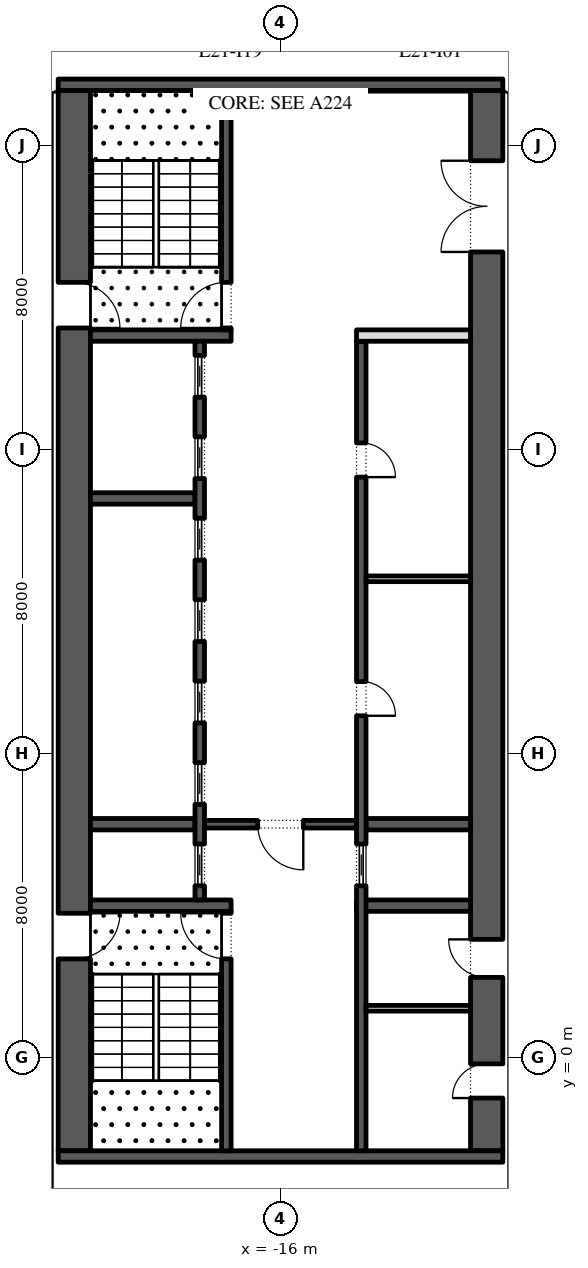
"""IFC4 building model, lengths in metres.
Left out: names, types, materials, properties, quantities, classifications, styles, units other than length and angle.
Written with IfcOpenShell. Run it as: python <this file> out.ifc"""

import sys

from ifc_helpers import new_model, si_unit, direction, frame, frame_2d, origin, place, context, subcontext, project, spatial, rectangle, extrude, element, fill, save


model = new_model("IFC4")
c1 = context("Model", 3, precision=1e-05, world=origin(), true_north=direction((0.0, 1.0)))
c2 = subcontext(c1, "Body", "Model", "MODEL_VIEW")
j1 = project(units=[si_unit("LENGTHUNIT", "METRE"), si_unit("PLANEANGLEUNIT", "RADIAN")], contexts=[c1])
p1 = place(None, origin())
s1 = spatial("IfcSite", under=j1, at=p1, CompositionType="ELEMENT")
p2 = place(p1, origin())
s2 = spatial("IfcBuilding", under=s1, at=p2, CompositionType="ELEMENT")
p3 = place(p2, frame((0.0, 0.0, 99.6)))
s3 = spatial("IfcBuildingStorey", under=s2, at=p3, CompositionType="ELEMENT", Elevation=99.6)
p4 = place(p3, frame((-21.425, -2.45, 0.0), z_axis=(0.0, 0.0, 1.0), x_axis=(0.0, 1.0, 0.0)))
e1 = element("IfcWall", 1, at=p4, inside=s3, PredefinedType="SHEAR", context=c2, shape_type="SweptSolid", body=[
    extrude(rectangle(XDim=27.9, YDim=0.85, at=frame_2d((13.95, 0.0))), origin(), (0.0, 0.0, 1.0), 5.8),
])
p5 = place(p4, frame((5.05, 0.0, 0.0)))
e2 = element("IfcOpeningElement", 2, at=p5, cuts=e1, PredefinedType="OPENING", context=c2, shape_type="SweptSolid", body=[
    extrude(rectangle(XDim=1.2, YDim=2.1, at=frame_2d((0.6, 1.05))), frame((0.0, 0.435, 0.0), z_axis=(0.0, -1.0, 0.0), x_axis=(1.0, 0.0, 0.0)), (0.0, 0.0, 1.0), 0.87),
])
p6 = place(p4, frame((21.65, 0.0, 0.0)))
e3 = element("IfcOpeningElement", 3, at=p6, cuts=e1, PredefinedType="OPENING", context=c2, shape_type="SweptSolid", body=[
    extrude(rectangle(XDim=1.2, YDim=2.1, at=frame_2d((0.6, 1.05))), frame((0.0, 0.435, 0.0), z_axis=(0.0, -1.0, 0.0), x_axis=(1.0, 0.0, 0.0)), (0.0, 0.0, 1.0), 0.87),
])
p7 = place(p3, frame((-10.575, -2.45, 0.0), z_axis=(0.0, 0.0, 1.0), x_axis=(0.0, 1.0, 0.0)))
e4 = element("IfcWall", 4, at=p7, inside=s3, PredefinedType="SHEAR", context=c2, shape_type="SweptSolid", body=[
    extrude(rectangle(XDim=27.9, YDim=0.85, at=frame_2d((13.95, 0.0))), origin(), (0.0, 0.0, 1.0), 5.8),
])
p8 = place(p7, frame((23.65, 0.0, 0.0)))
e5 = element("IfcOpeningElement", 5, at=p8, cuts=e4, PredefinedType="OPENING", context=c2, shape_type="SweptSolid", body=[
    extrude(rectangle(XDim=2.4, YDim=2.1, at=frame_2d((1.2, 1.05))), frame((0.0, 0.435, 0.0), z_axis=(0.0, -1.0, 0.0), x_axis=(1.0, 0.0, 0.0)), (0.0, 0.0, 1.0), 0.87),
])
p9 = place(p7, frame((1.387, 0.0, 0.0)))
e6 = element("IfcOpeningElement", 6, at=p9, cuts=e4, PredefinedType="OPENING", context=c2, shape_type="SweptSolid", body=[
    extrude(rectangle(XDim=0.9, YDim=2.1, at=frame_2d((0.45, 1.05))), frame((0.0, 0.435, 0.0), z_axis=(0.0, -1.0, 0.0), x_axis=(1.0, 0.0, 0.0)), (0.0, 0.0, 1.0), 0.87),
])
p10 = place(p7, frame((4.562, 0.0, 0.0)))
e7 = element("IfcOpeningElement", 7, at=p10, cuts=e4, PredefinedType="OPENING", context=c2, shape_type="SweptSolid", body=[
    extrude(rectangle(XDim=1.0, YDim=2.1, at=frame_2d((0.5, 1.05))), frame((0.0, 0.435, 0.0), z_axis=(0.0, -1.0, 0.0), x_axis=(1.0, 0.0, 0.0)), (0.0, 0.0, 1.0), 0.87),
])
for number, where, z_axis, x_axis in (
    (8, (-21.85, -2.6, 0.0), (0.0, 0.0, 1.0), (1.0, 0.0, 0.0)),
    (9, (-21.85, 25.6, 0.0), (0.0, 0.0, 1.0), (1.0, 0.0, 0.0)),
):
    element("IfcWall", number, at=place(p3, frame(where, z_axis=z_axis, x_axis=x_axis)), inside=s3, PredefinedType="SHEAR", context=c2, shape_type="SweptSolid", body=[
        extrude(rectangle(XDim=11.7, YDim=0.3, at=frame_2d((5.85, 0.0))), origin(), (0.0, 0.0, 1.0), 5.8),
    ])
p11 = place(p3, frame((-21.0, 4.0, 0.0), z_axis=(0.0, 0.0, 1.0), x_axis=(1.0, 0.0, 0.0)))
e10 = element("IfcWall", 10, at=p11, inside=s3, PredefinedType="SHEAR", context=c2, shape_type="SweptSolid", body=[
    extrude(rectangle(XDim=3.7, YDim=0.3, at=frame_2d((1.85, 0.0))), origin(), (0.0, 0.0, 1.0), 5.8),
])
p12 = place(p3, frame((-17.425, -2.45, 0.0), z_axis=(0.0, 0.0, 1.0), x_axis=(0.0, 1.0, 0.0)))
e11 = element("IfcWall", 11, at=p12, inside=s3, PredefinedType="SHEAR", context=c2, shape_type="SweptSolid", body=[
    extrude(rectangle(XDim=6.3, YDim=0.25, at=frame_2d((3.15, 0.0))), origin(), (0.0, 0.0, 1.0), 5.8),
])
p13 = place(p12, frame((5.05, 0.0, 0.0)))
e12 = element("IfcOpeningElement", 12, at=p13, cuts=e11, PredefinedType="OPENING", context=c2, shape_type="SweptSolid", body=[
    extrude(rectangle(XDim=1.2, YDim=2.1, at=frame_2d((0.6, 1.05))), frame((0.0, 0.135, 0.0), z_axis=(0.0, -1.0, 0.0), x_axis=(1.0, 0.0, 0.0)), (0.0, 0.0, 1.0), 0.27),
])
p14 = place(p3, frame((-21.0, 19.0, 0.0), z_axis=(0.0, 0.0, 1.0), x_axis=(1.0, 0.0, 0.0)))
e13 = element("IfcWall", 13, at=p14, inside=s3, PredefinedType="SHEAR", context=c2, shape_type="SweptSolid", body=[
    extrude(rectangle(XDim=3.7, YDim=0.3, at=frame_2d((1.85, 0.0))), origin(), (0.0, 0.0, 1.0), 5.8),
])
p15 = place(p3, frame((-17.425, 19.15, 0.0), z_axis=(0.0, 0.0, 1.0), x_axis=(0.0, 1.0, 0.0)))
e14 = element("IfcWall", 14, at=p15, inside=s3, PredefinedType="SHEAR", context=c2, shape_type="SweptSolid", body=[
    extrude(rectangle(XDim=6.3, YDim=0.25, at=frame_2d((3.15, 0.0))), origin(), (0.0, 0.0, 1.0), 5.8),
])
p16 = place(p15, frame((0.05, 0.0, 0.0)))
e15 = element("IfcOpeningElement", 15, at=p16, cuts=e14, PredefinedType="OPENING", context=c2, shape_type="SweptSolid", body=[
    extrude(rectangle(XDim=1.2, YDim=2.1, at=frame_2d((0.6, 1.05))), frame((0.0, 0.135, 0.0), z_axis=(0.0, -1.0, 0.0), x_axis=(1.0, 0.0, 0.0)), (0.0, 0.0, 1.0), 0.27),
])
for number, where, z_axis, x_axis in (
    (16, (-21.0, 6.143, 0.0), (0.0, 0.0, 1.0), (1.0, 0.0, 0.0)),
    (17, (-21.0, 14.714, 0.0), (0.0, 0.0, 1.0), (1.0, 0.0, 0.0)),
):
    element("IfcWall", number, at=place(p3, frame(where, z_axis=z_axis, x_axis=x_axis)), inside=s3, PredefinedType="SHEAR", context=c2, shape_type="SweptSolid", body=[
        extrude(rectangle(XDim=2.75, YDim=0.3, at=frame_2d((1.375, 0.0))), origin(), (0.0, 0.0, 1.0), 5.8),
    ])
p17 = place(p3, frame((-18.125, 4.15, 0.0), z_axis=(0.0, 0.0, 1.0), x_axis=(0.0, 1.0, 0.0)))
e18 = element("IfcWall", 18, at=p17, inside=s3, PredefinedType="SHEAR", context=c2, shape_type="SweptSolid", body=[
    extrude(rectangle(XDim=14.7, YDim=0.25, at=frame_2d((7.35, 0.0))), origin(), (0.0, 0.0, 1.0), 5.8),
])
p18 = place(p17, frame((0.371, 0.0, 0.0)))
e19 = element("IfcOpeningElement", 19, at=p18, cuts=e18, PredefinedType="OPENING", context=c2, shape_type="SweptSolid", body=[
    extrude(rectangle(XDim=1.1, YDim=2.1, at=frame_2d((0.55, 1.05))), frame((0.0, 0.135, 0.0), z_axis=(0.0, -1.0, 0.0), x_axis=(1.0, 0.0, 0.0)), (0.0, 0.0, 1.0), 0.27),
])
p19 = place(p17, frame((2.514, 0.0, 0.0)))
e20 = element("IfcOpeningElement", 20, at=p19, cuts=e18, PredefinedType="OPENING", context=c2, shape_type="SweptSolid", body=[
    extrude(rectangle(XDim=1.1, YDim=2.1, at=frame_2d((0.55, 1.05))), frame((0.0, 0.135, 0.0), z_axis=(0.0, -1.0, 0.0), x_axis=(1.0, 0.0, 0.0)), (0.0, 0.0, 1.0), 0.27),
])
p20 = place(p17, frame((4.657, 0.0, 0.0)))
e21 = element("IfcOpeningElement", 21, at=p20, cuts=e18, PredefinedType="OPENING", context=c2, shape_type="SweptSolid", body=[
    extrude(rectangle(XDim=1.1, YDim=2.1, at=frame_2d((0.55, 1.05))), frame((0.0, 0.135, 0.0), z_axis=(0.0, -1.0, 0.0), x_axis=(1.0, 0.0, 0.0)), (0.0, 0.0, 1.0), 0.27),
])
p21 = place(p17, frame((6.8, 0.0, 0.0)))
e22 = element("IfcOpeningElement", 22, at=p21, cuts=e18, PredefinedType="OPENING", context=c2, shape_type="SweptSolid", body=[
    extrude(rectangle(XDim=1.1, YDim=2.1, at=frame_2d((0.55, 1.05))), frame((0.0, 0.135, 0.0), z_axis=(0.0, -1.0, 0.0), x_axis=(1.0, 0.0, 0.0)), (0.0, 0.0, 1.0), 0.27),
])
p22 = place(p17, frame((8.943, 0.0, 0.0)))
e23 = element("IfcOpeningElement", 23, at=p22, cuts=e18, PredefinedType="OPENING", context=c2, shape_type="SweptSolid", body=[
    extrude(rectangle(XDim=1.1, YDim=2.1, at=frame_2d((0.55, 1.05))), frame((0.0, 0.135, 0.0), z_axis=(0.0, -1.0, 0.0), x_axis=(1.0, 0.0, 0.0)), (0.0, 0.0, 1.0), 0.27),
])
p23 = place(p17, frame((11.086, 0.0, 0.0)))
e24 = element("IfcOpeningElement", 24, at=p23, cuts=e18, PredefinedType="OPENING", context=c2, shape_type="SweptSolid", body=[
    extrude(rectangle(XDim=1.1, YDim=2.1, at=frame_2d((0.55, 1.05))), frame((0.0, 0.135, 0.0), z_axis=(0.0, -1.0, 0.0), x_axis=(1.0, 0.0, 0.0)), (0.0, 0.0, 1.0), 0.27),
])
p24 = place(p17, frame((13.229, 0.0, 0.0)))
e25 = element("IfcOpeningElement", 25, at=p24, cuts=e18, PredefinedType="OPENING", context=c2, shape_type="SweptSolid", body=[
    extrude(rectangle(XDim=1.1, YDim=2.1, at=frame_2d((0.55, 1.05))), frame((0.0, 0.135, 0.0), z_axis=(0.0, -1.0, 0.0), x_axis=(1.0, 0.0, 0.0)), (0.0, 0.0, 1.0), 0.27),
])
p25 = place(p3, frame((-14.0, 4.0, 0.0), z_axis=(0.0, 0.0, 1.0), x_axis=(1.0, 0.0, 0.0)))
e26 = element("IfcWall", 26, at=p25, inside=s3, PredefinedType="SHEAR", context=c2, shape_type="SweptSolid", body=[
    extrude(rectangle(XDim=3.0, YDim=0.3, at=frame_2d((1.5, 0.0))), origin(), (0.0, 0.0, 1.0), 5.8),
])
p26 = place(p3, frame((-13.75, 6.143, 0.0), z_axis=(0.0, 0.0, 1.0), x_axis=(1.0, 0.0, 0.0)))
e27 = element("IfcWall", 27, at=p26, inside=s3, PredefinedType="SHEAR", context=c2, shape_type="SweptSolid", body=[
    extrude(rectangle(XDim=2.75, YDim=0.3, at=frame_2d((1.375, 0.0))), origin(), (0.0, 0.0, 1.0), 5.8),
])
p27 = place(p3, frame((-13.875, -2.45, 0.0), z_axis=(0.0, 0.0, 1.0), x_axis=(0.0, 1.0, 0.0)))
e28 = element("IfcWall", 28, at=p27, inside=s3, PredefinedType="SHEAR", context=c2, shape_type="SweptSolid", body=[
    extrude(rectangle(XDim=21.3, YDim=0.25, at=frame_2d((10.65, 0.0))), origin(), (0.0, 0.0, 1.0), 5.8),
])
p28 = place(p27, frame((11.446, 0.0, 0.0)))
e29 = element("IfcOpeningElement", 29, at=p28, cuts=e28, PredefinedType="OPENING", context=c2, shape_type="SweptSolid", body=[
    extrude(rectangle(XDim=0.9, YDim=2.1, at=frame_2d((0.45, 1.05))), frame((0.0, 0.135, 0.0), z_axis=(0.0, -1.0, 0.0), x_axis=(1.0, 0.0, 0.0)), (0.0, 0.0, 1.0), 0.27),
])
p29 = place(p27, frame((17.725, 0.0, 0.0)))
e30 = element("IfcOpeningElement", 30, at=p29, cuts=e28, PredefinedType="OPENING", context=c2, shape_type="SweptSolid", body=[
    extrude(rectangle(XDim=0.9, YDim=2.1, at=frame_2d((0.45, 1.05))), frame((0.0, 0.135, 0.0), z_axis=(0.0, -1.0, 0.0), x_axis=(1.0, 0.0, 0.0)), (0.0, 0.0, 1.0), 0.27),
])
p30 = place(p27, frame((6.971, 0.0, 0.0)))
e31 = element("IfcOpeningElement", 31, at=p30, cuts=e28, PredefinedType="OPENING", context=c2, shape_type="SweptSolid", body=[
    extrude(rectangle(XDim=1.1, YDim=2.1, at=frame_2d((0.55, 1.05))), frame((0.0, 0.135, 0.0), z_axis=(0.0, -1.0, 0.0), x_axis=(1.0, 0.0, 0.0)), (0.0, 0.0, 1.0), 0.27),
])
p31 = place(p3, frame((-14.0, 19.0, 0.0), z_axis=(0.0, 0.0, 1.0), x_axis=(1.0, 0.0, 0.0)))
e32 = element("IfcWall", 32, at=p31, inside=s3, PredefinedType="PARTITIONING", context=c2, shape_type="SweptSolid", body=[
    extrude(rectangle(XDim=3.0, YDim=0.3, at=frame_2d((1.5, 0.0))), origin(), (0.0, 0.0, 1.0), 5.8),
])
p32 = place(p3, frame((-13.75, 12.6, 0.0), z_axis=(0.0, 0.0, 1.0), x_axis=(1.0, 0.0, 0.0)))
e33 = element("IfcWall", 33, at=p32, inside=s3, PredefinedType="PARTITIONING", context=c2, shape_type="SweptSolid", body=[
    extrude(rectangle(XDim=2.75, YDim=0.15, at=frame_2d((1.375, 0.0))), origin(), (0.0, 0.0, 1.0), 5.8),
])
p33 = place(p3, frame((-18.0, 6.143, 0.0), z_axis=(0.0, 0.0, 1.0), x_axis=(1.0, 0.0, 0.0)))
e34 = element("IfcWall", 34, at=p33, inside=s3, PredefinedType="SHEAR", context=c2, shape_type="SweptSolid", body=[
    extrude(rectangle(XDim=4.0, YDim=0.2, at=frame_2d((2.0, 0.0))), origin(), (0.0, 0.0, 1.0), 5.8),
])
p34 = place(p33, frame((1.4, 0.0, 0.0)))
e35 = element("IfcOpeningElement", 35, at=p34, cuts=e34, PredefinedType="OPENING", context=c2, shape_type="SweptSolid", body=[
    extrude(rectangle(XDim=1.2, YDim=2.1, at=frame_2d((0.6, 1.05))), frame((0.0, 0.11, 0.0), z_axis=(0.0, -1.0, 0.0), x_axis=(1.0, 0.0, 0.0)), (0.0, 0.0, 1.0), 0.22),
])
p35 = place(p3, frame((-13.75, 1.3, 0.0), z_axis=(0.0, 0.0, 1.0), x_axis=(1.0, 0.0, 0.0)))
e36 = element("IfcWall", 36, at=p35, inside=s3, PredefinedType="PARTITIONING", context=c2, shape_type="SweptSolid", body=[
    extrude(rectangle(XDim=2.75, YDim=0.15, at=frame_2d((1.375, 0.0))), origin(), (0.0, 0.0, 1.0), 5.8),
])
p36 = place(p18, origin())
e37 = element("IfcDoor", 37, at=p36, inside=s3, OperationType="SLIDING_TO_LEFT", PredefinedType="DOOR", context=c2, shape_type="SweptSolid", body=[
    extrude(rectangle(XDim=1.1, YDim=2.1, at=frame_2d((0.55, 1.05))), frame((0.0, 0.025, 0.0), z_axis=(0.0, -1.0, 0.0), x_axis=(1.0, 0.0, 0.0)), (0.0, 0.0, 1.0), 0.05),
])
fill(e19, e37)
p37 = place(p19, origin())
e38 = element("IfcDoor", 38, at=p37, inside=s3, OperationType="SLIDING_TO_LEFT", PredefinedType="DOOR", context=c2, shape_type="SweptSolid", body=[
    extrude(rectangle(XDim=1.1, YDim=2.1, at=frame_2d((0.55, 1.05))), frame((0.0, 0.025, 0.0), z_axis=(0.0, -1.0, 0.0), x_axis=(1.0, 0.0, 0.0)), (0.0, 0.0, 1.0), 0.05),
])
fill(e20, e38)
p38 = place(p20, origin())
e39 = element("IfcDoor", 39, at=p38, inside=s3, OperationType="SLIDING_TO_LEFT", PredefinedType="DOOR", context=c2, shape_type="SweptSolid", body=[
    extrude(rectangle(XDim=1.1, YDim=2.1, at=frame_2d((0.55, 1.05))), frame((0.0, 0.025, 0.0), z_axis=(0.0, -1.0, 0.0), x_axis=(1.0, 0.0, 0.0)), (0.0, 0.0, 1.0), 0.05),
])
fill(e21, e39)
p39 = place(p21, origin())
e40 = element("IfcDoor", 40, at=p39, inside=s3, OperationType="SLIDING_TO_LEFT", PredefinedType="DOOR", context=c2, shape_type="SweptSolid", body=[
    extrude(rectangle(XDim=1.1, YDim=2.1, at=frame_2d((0.55, 1.05))), frame((0.0, 0.025, 0.0), z_axis=(0.0, -1.0, 0.0), x_axis=(1.0, 0.0, 0.0)), (0.0, 0.0, 1.0), 0.05),
])
fill(e22, e40)
p40 = place(p22, origin())
e41 = element("IfcDoor", 41, at=p40, inside=s3, OperationType="SLIDING_TO_LEFT", PredefinedType="DOOR", context=c2, shape_type="SweptSolid", body=[
    extrude(rectangle(XDim=1.1, YDim=2.1, at=frame_2d((0.55, 1.05))), frame((0.0, 0.025, 0.0), z_axis=(0.0, -1.0, 0.0), x_axis=(1.0, 0.0, 0.0)), (0.0, 0.0, 1.0), 0.05),
])
fill(e23, e41)
p41 = place(p23, origin())
e42 = element("IfcDoor", 42, at=p41, inside=s3, OperationType="SLIDING_TO_LEFT", PredefinedType="DOOR", context=c2, shape_type="SweptSolid", body=[
    extrude(rectangle(XDim=1.1, YDim=2.1, at=frame_2d((0.55, 1.05))), frame((0.0, 0.025, 0.0), z_axis=(0.0, -1.0, 0.0), x_axis=(1.0, 0.0, 0.0)), (0.0, 0.0, 1.0), 0.05),
])
fill(e24, e42)
p42 = place(p24, origin())
e43 = element("IfcDoor", 43, at=p42, inside=s3, OperationType="SLIDING_TO_LEFT", PredefinedType="DOOR", context=c2, shape_type="SweptSolid", body=[
    extrude(rectangle(XDim=1.1, YDim=2.1, at=frame_2d((0.55, 1.05))), frame((0.0, 0.025, 0.0), z_axis=(0.0, -1.0, 0.0), x_axis=(1.0, 0.0, 0.0)), (0.0, 0.0, 1.0), 0.05),
])
fill(e25, e43)
p43 = place(p28, frame((0.9, -0.2, 0.0), z_axis=(0.0, 0.0, 1.0), x_axis=(-1.0, 0.0, 0.0)))
e44 = element("IfcDoor", 44, at=p43, inside=s3, OperationType="SINGLE_SWING_LEFT", PredefinedType="DOOR", context=c2, shape_type="SweptSolid", body=[
    extrude(rectangle(XDim=0.9, YDim=2.1, at=frame_2d((0.45, 1.05))), frame((0.0, -0.075, 0.0), z_axis=(0.0, -1.0, 0.0), x_axis=(1.0, 0.0, 0.0)), (0.0, 0.0, 1.0), 0.05),
])
fill(e29, e44)
p44 = place(p29, frame((0.9, -0.2, 0.0), z_axis=(0.0, 0.0, 1.0), x_axis=(-1.0, 0.0, 0.0)))
e45 = element("IfcDoor", 45, at=p44, inside=s3, OperationType="SINGLE_SWING_LEFT", PredefinedType="DOOR", context=c2, shape_type="SweptSolid", body=[
    extrude(rectangle(XDim=0.9, YDim=2.1, at=frame_2d((0.45, 1.05))), frame((0.0, -0.075, 0.0), z_axis=(0.0, -1.0, 0.0), x_axis=(1.0, 0.0, 0.0)), (0.0, 0.0, 1.0), 0.05),
])
fill(e30, e45)
p45 = place(p30, origin())
e46 = element("IfcDoor", 46, at=p45, inside=s3, OperationType="SLIDING_TO_LEFT", PredefinedType="DOOR", context=c2, shape_type="SweptSolid", body=[
    extrude(rectangle(XDim=1.1, YDim=2.1, at=frame_2d((0.55, 1.05))), frame((0.0, 0.025, 0.0), z_axis=(0.0, -1.0, 0.0), x_axis=(1.0, 0.0, 0.0)), (0.0, 0.0, 1.0), 0.05),
])
fill(e31, e46)
p46 = place(p34, frame((1.2, 0.0, 0.0), z_axis=(0.0, 0.0, 1.0), x_axis=(-1.0, 0.0, 0.0)))
e47 = element("IfcDoor", 47, at=p46, inside=s3, OperationType="SINGLE_SWING_RIGHT", PredefinedType="DOOR", context=c2, shape_type="SweptSolid", body=[
    extrude(rectangle(XDim=1.2, YDim=2.1, at=frame_2d((0.6, 1.05))), frame((0.0, 0.025, 0.0), z_axis=(0.0, -1.0, 0.0), x_axis=(1.0, 0.0, 0.0)), (0.0, 0.0, 1.0), 0.05),
])
fill(e35, e47)
p47 = place(p8, origin())
e48 = element("IfcDoor", 48, at=p47, inside=s3, OperationType="DOUBLE_DOOR_SINGLE_SWING", PredefinedType="DOOR", context=c2, shape_type="SweptSolid", body=[
    extrude(rectangle(XDim=2.4, YDim=2.1, at=frame_2d((1.2, 1.05))), frame((0.0, 0.025, 0.0), z_axis=(0.0, -1.0, 0.0), x_axis=(1.0, 0.0, 0.0)), (0.0, 0.0, 1.0), 0.05),
])
fill(e5, e48)
p48 = place(p13, origin())
e49 = element("IfcDoor", 49, at=p48, inside=s3, OperationType="SINGLE_SWING_LEFT", PredefinedType="DOOR", context=c2, shape_type="SweptSolid", body=[
    extrude(rectangle(XDim=1.2, YDim=2.1, at=frame_2d((0.6, 1.05))), frame((0.0, 0.025, 0.0), z_axis=(0.0, -1.0, 0.0), x_axis=(1.0, 0.0, 0.0)), (0.0, 0.0, 1.0), 0.05),
])
fill(e12, e49)
p49 = place(p5, frame((1.2, 0.0, 0.0), z_axis=(0.0, 0.0, 1.0), x_axis=(-1.0, 0.0, 0.0)))
e50 = element("IfcDoor", 50, at=p49, inside=s3, OperationType="SINGLE_SWING_RIGHT", PredefinedType="DOOR", context=c2, shape_type="SweptSolid", body=[
    extrude(rectangle(XDim=1.2, YDim=2.1, at=frame_2d((0.6, 1.05))), frame((0.0, 0.025, 0.0), z_axis=(0.0, -1.0, 0.0), x_axis=(1.0, 0.0, 0.0)), (0.0, 0.0, 1.0), 0.05),
])
fill(e2, e50)
p50 = place(p16, origin())
e51 = element("IfcDoor", 51, at=p50, inside=s3, OperationType="SINGLE_SWING_RIGHT", PredefinedType="DOOR", context=c2, shape_type="SweptSolid", body=[
    extrude(rectangle(XDim=1.2, YDim=2.1, at=frame_2d((0.6, 1.05))), frame((0.0, 0.025, 0.0), z_axis=(0.0, -1.0, 0.0), x_axis=(1.0, 0.0, 0.0)), (0.0, 0.0, 1.0), 0.05),
])
fill(e15, e51)
p51 = place(p6, frame((1.2, 0.0, 0.0), z_axis=(0.0, 0.0, 1.0), x_axis=(-1.0, 0.0, 0.0)))
e52 = element("IfcDoor", 52, at=p51, inside=s3, OperationType="SINGLE_SWING_LEFT", PredefinedType="DOOR", context=c2, shape_type="SweptSolid", body=[
    extrude(rectangle(XDim=1.2, YDim=2.1, at=frame_2d((0.6, 1.05))), frame((0.0, 0.025, 0.0), z_axis=(0.0, -1.0, 0.0), x_axis=(1.0, 0.0, 0.0)), (0.0, 0.0, 1.0), 0.05),
])
fill(e3, e52)
p52 = place(p9, origin())
e53 = element("IfcDoor", 53, at=p52, inside=s3, OperationType="SINGLE_SWING_RIGHT", PredefinedType="DOOR", context=c2, shape_type="SweptSolid", body=[
    extrude(rectangle(XDim=0.9, YDim=2.1, at=frame_2d((0.45, 1.05))), frame((0.0, 0.425, 0.0), z_axis=(0.0, -1.0, 0.0), x_axis=(1.0, 0.0, 0.0)), (0.0, 0.0, 1.0), 0.05),
])
fill(e6, e53)
p53 = place(p10, origin())
e54 = element("IfcDoor", 54, at=p53, inside=s3, OperationType="SINGLE_SWING_LEFT", PredefinedType="DOOR", context=c2, shape_type="SweptSolid", body=[
    extrude(rectangle(XDim=1.0, YDim=2.1, at=frame_2d((0.5, 1.05))), frame((0.0, 0.425, 0.0), z_axis=(0.0, -1.0, 0.0), x_axis=(1.0, 0.0, 0.0)), (0.0, 0.0, 1.0), 0.05),
])
fill(e7, e54)
save(model, sys.argv[1])
